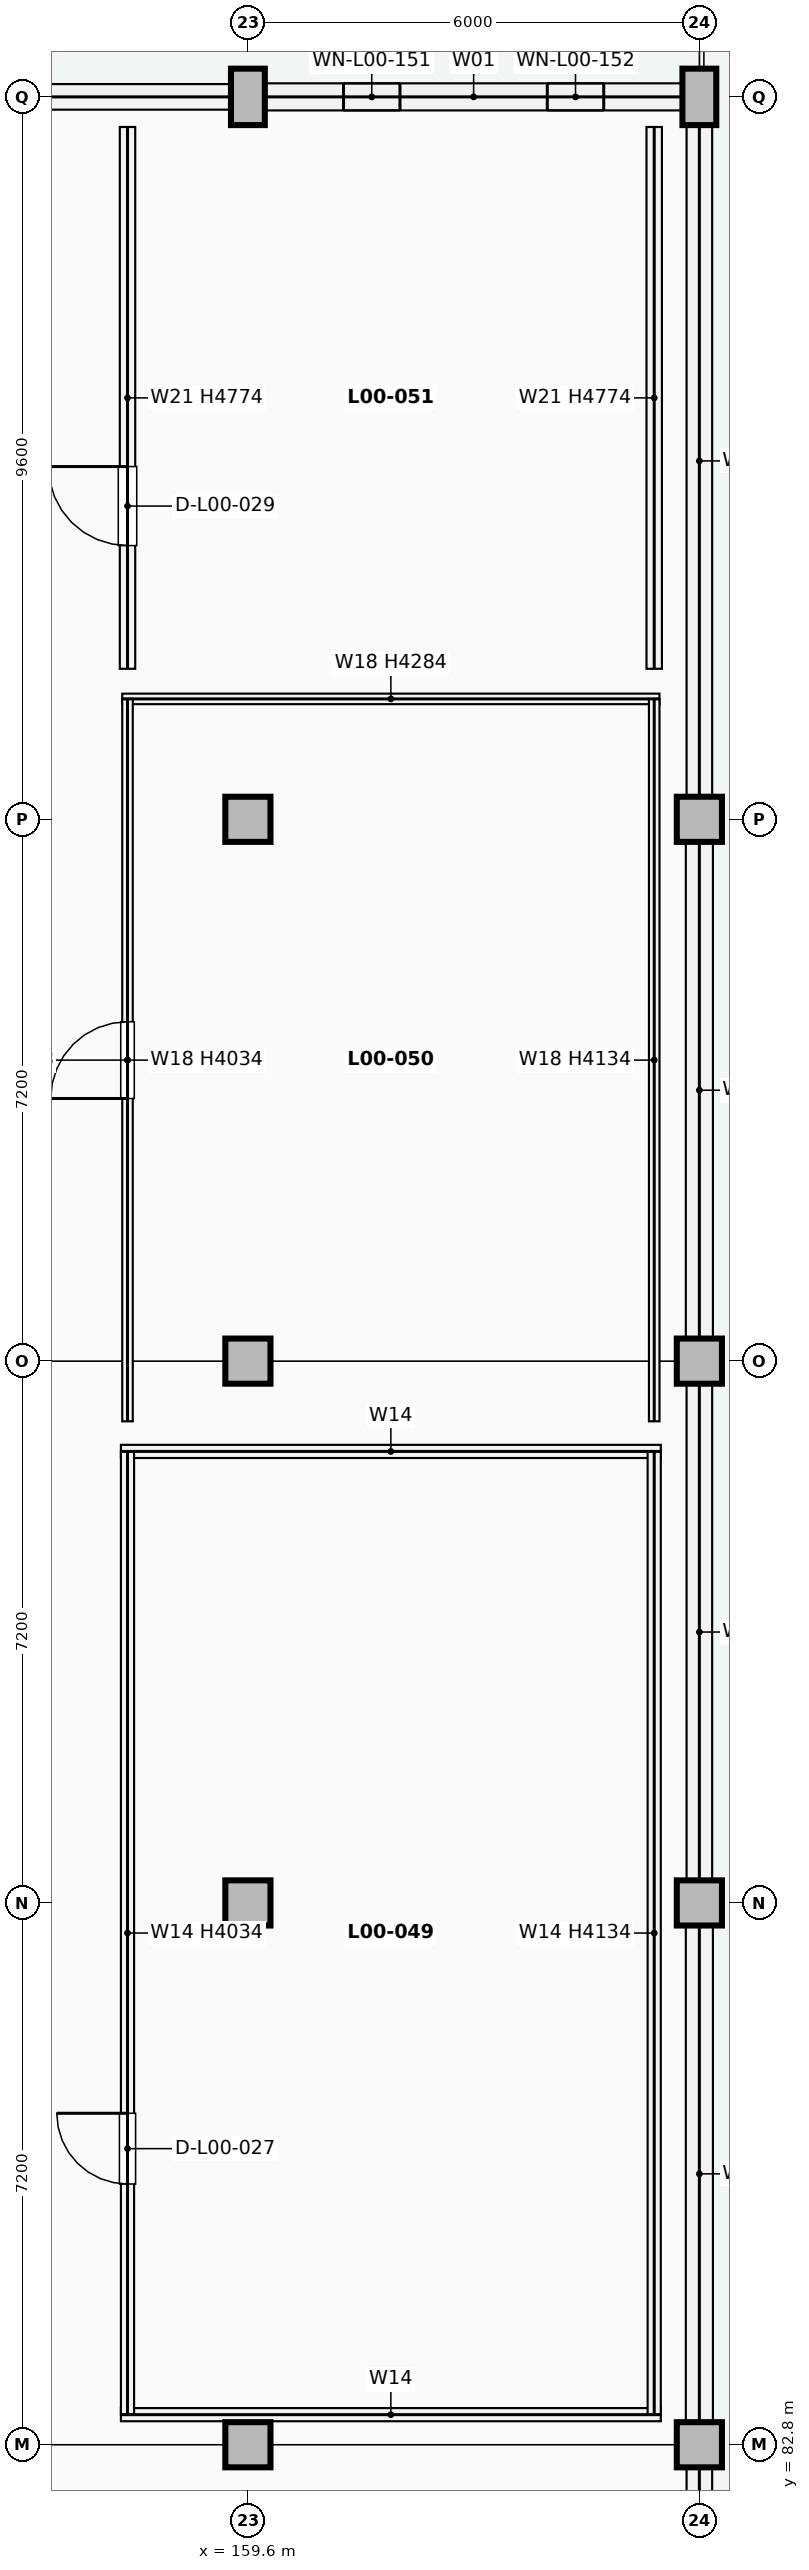
"""IFC4 building model, lengths in metres.
Left out: names, types, materials, properties, quantities, classifications, styles, units other than length and angle.
Written with IfcOpenShell. Run it as: python <this file> out.ifc"""

import sys

from ifc_helpers import new_model, si_unit, direction, frame, frame_2d, origin, origin_2d, place, context, subcontext, project, spatial, rectangle, extrude, element, fill, save


model = new_model("IFC4")
c1 = context("Model", 3, precision=1e-05, world=origin(), true_north=direction((0.0, 1.0)))
c2 = subcontext(c1, "Body", "Model", "MODEL_VIEW")
j1 = project(units=[si_unit("LENGTHUNIT", "METRE"), si_unit("PLANEANGLEUNIT", "RADIAN")], contexts=[c1])
p1 = place(None, origin())
s1 = spatial("IfcSite", under=j1, at=p1, CompositionType="ELEMENT")
p2 = place(p1, origin())
s2 = spatial("IfcBuilding", under=s1, at=p2, CompositionType="ELEMENT")
p3 = place(p2, origin())
s3 = spatial("IfcBuildingStorey", under=s2, at=p3, CompositionType="ELEMENT", Elevation=0.0)
for number, where, z_axis, x_axis in (
    (1, (159.6, 82.8, 0.0), (0.0, 0.0, 1.0), (1.0, 0.0, 0.0)),
    (2, (159.6, 90.0, 0.0), (0.0, 0.0, 1.0), (1.0, 0.0, 0.0)),
    (3, (159.6, 97.2, 0.0), (0.0, 0.0, 1.0), (1.0, 0.0, 0.0)),
    (4, (159.6, 104.4, 0.0), (0.0, 0.0, 1.0), (1.0, 0.0, 0.0)),
):
    element("IfcColumn", number, at=place(p3, frame(where, z_axis=z_axis, x_axis=x_axis)), inside=s3, PredefinedType="COLUMN", context=c2, shape_type="SweptSolid", body=[
        extrude(rectangle(XDim=0.6, YDim=0.6, at=origin_2d()), origin(), (0.0, 0.0, 1.0), 5.1),
    ])
p4 = place(p3, frame((159.6, 114.0, 0.0), z_axis=(0.0, 0.0, 1.0), x_axis=(1.0, 0.0, 0.0)))
e5 = element("IfcColumn", 5, at=p4, inside=s3, PredefinedType="PILASTER", context=c2, shape_type="SweptSolid", body=[
    extrude(rectangle(XDim=0.45, YDim=0.75, at=origin_2d()), origin(), (0.0, 0.0, 1.0), 5.1),
])
for number, where, z_axis, x_axis in (
    (6, (165.6, 82.8, 0.0), (0.0, 0.0, 1.0), (1.0, 0.0, 0.0)),
    (7, (165.6, 90.0, 0.0), (0.0, 0.0, 1.0), (1.0, 0.0, 0.0)),
    (8, (165.6, 97.2, 0.0), (0.0, 0.0, 1.0), (1.0, 0.0, 0.0)),
    (9, (165.6, 104.4, 0.0), (0.0, 0.0, 1.0), (1.0, 0.0, 0.0)),
):
    element("IfcColumn", number, at=place(p3, frame(where, z_axis=z_axis, x_axis=x_axis)), inside=s3, PredefinedType="COLUMN", context=c2, shape_type="SweptSolid", body=[
        extrude(rectangle(XDim=0.6, YDim=0.6, at=origin_2d()), origin(), (0.0, 0.0, 1.0), 5.1),
    ])
p5 = place(p3, frame((165.6, 114.0, 0.0), z_axis=(0.0, 0.0, 1.0), x_axis=(1.0, 0.0, 0.0)))
e10 = element("IfcColumn", 10, at=p5, inside=s3, PredefinedType="PILASTER", context=c2, shape_type="SweptSolid", body=[
    extrude(rectangle(XDim=0.45, YDim=0.75, at=origin_2d()), origin(), (0.0, 0.0, 1.0), 5.1),
])
p6 = place(p3, frame((150.227, 114.0, 0.0), z_axis=(0.0, 0.0, 1.0), x_axis=(1.0, 0.0, 0.0)))
e11 = element("IfcWall", 11, at=p6, inside=s3, PredefinedType="SOLIDWALL", context=c2, shape_type="SweptSolid", body=[
    extrude(rectangle(XDim=9.146, YDim=0.34, at=frame_2d((4.573, 0.0))), origin(), (0.0, 0.0, 1.0), 4.284),
])
p7 = place(p6, frame((3.673, 0.0, 0.0)))
e12 = element("IfcOpeningElement", 12, at=p7, cuts=e11, PredefinedType="OPENING", context=c2, shape_type="SweptSolid", body=[
    extrude(rectangle(XDim=1.8, YDim=2.3, at=frame_2d((0.9, 1.15))), frame((0.0, 0.18, 0.0), z_axis=(0.0, -1.0, 0.0), x_axis=(1.0, 0.0, 0.0)), (0.0, 0.0, 1.0), 0.36),
])
p8 = place(p3, frame((159.827, 114.0, 0.0), z_axis=(0.0, 0.0, 1.0), x_axis=(1.0, 0.0, 0.0)))
e13 = element("IfcWall", 13, at=p8, inside=s3, PredefinedType="SOLIDWALL", context=c2, shape_type="SweptSolid", body=[
    extrude(rectangle(XDim=5.546, YDim=0.36, at=frame_2d((2.773, 0.0))), origin(), (0.0, 0.0, 1.0), 4.284),
])
p9 = place(p8, frame((1.044, 0.0, 0.75)))
e14 = element("IfcOpeningElement", 14, at=p9, cuts=e13, PredefinedType="OPENING", context=c2, shape_type="SweptSolid", body=[
    extrude(rectangle(XDim=0.75, YDim=1.7, at=frame_2d((0.375, 0.85))), frame((0.0, 0.19, 0.0), z_axis=(0.0, -1.0, 0.0), x_axis=(1.0, 0.0, 0.0)), (0.0, 0.0, 1.0), 0.38),
])
p10 = place(p8, frame((3.752, 0.0, 0.75)))
e15 = element("IfcOpeningElement", 15, at=p10, cuts=e13, PredefinedType="OPENING", context=c2, shape_type="SweptSolid", body=[
    extrude(rectangle(XDim=0.75, YDim=1.7, at=frame_2d((0.375, 0.85))), frame((0.0, 0.19, 0.0), z_axis=(0.0, -1.0, 0.0), x_axis=(1.0, 0.0, 0.0)), (0.0, 0.0, 1.0), 0.38),
])
p11 = place(p3, frame((165.6, 79.502, 0.0), z_axis=(0.0, 0.0, 1.0), x_axis=(0.0, 1.0, 0.0)))
e16 = element("IfcWall", 16, at=p11, inside=s3, PredefinedType="SOLIDWALL", context=c2, shape_type="SweptSolid", body=[
    extrude(rectangle(XDim=2.996, YDim=0.34, at=frame_2d((1.498, 0.0))), origin(), (0.0, 0.0, 1.0), 4.134),
])
p12 = place(p3, frame((165.6, 83.102, 0.0), z_axis=(0.0, 0.0, 1.0), x_axis=(0.0, 1.0, 0.0)))
e17 = element("IfcWall", 17, at=p12, inside=s3, PredefinedType="SOLIDWALL", context=c2, shape_type="SweptSolid", body=[
    extrude(rectangle(XDim=6.596, YDim=0.36, at=frame_2d((3.298, 0.0))), origin(), (0.0, 0.0, 1.0), 4.134),
])
p13 = place(p3, frame((165.6, 90.302, 0.0), z_axis=(0.0, 0.0, 1.0), x_axis=(0.0, 1.0, 0.0)))
e18 = element("IfcWall", 18, at=p13, inside=s3, PredefinedType="SOLIDWALL", context=c2, shape_type="SweptSolid", body=[
    extrude(rectangle(XDim=6.596, YDim=0.34, at=frame_2d((3.298, 0.0))), origin(), (0.0, 0.0, 1.0), 4.134),
])
p14 = place(p3, frame((165.6, 97.502, 0.0), z_axis=(0.0, 0.0, 1.0), x_axis=(0.0, 1.0, 0.0)))
e19 = element("IfcWall", 19, at=p14, inside=s3, PredefinedType="SOLIDWALL", context=c2, shape_type="SweptSolid", body=[
    extrude(rectangle(XDim=6.596, YDim=0.36, at=frame_2d((3.298, 0.0))), origin(), (0.0, 0.0, 1.0), 4.134),
])
p15 = place(p3, frame((165.6, 104.702, 0.0), z_axis=(0.0, 0.0, 1.0), x_axis=(0.0, 1.0, 0.0)))
e20 = element("IfcWall", 20, at=p15, inside=s3, PredefinedType="SOLIDWALL", context=c2, shape_type="SweptSolid", body=[
    extrude(rectangle(XDim=8.921, YDim=0.34, at=frame_2d((4.46, 0.0))), origin(), (0.0, 0.0, 1.0), 4.134),
])
for number, where, z_axis, x_axis in (
    (21, (157.913, 83.2, 0.0), (0.0, 0.0, 1.0), (1.0, 0.0, 0.0)),
    (22, (157.913, 96.0, 0.0), (0.0, 0.0, 1.0), (1.0, 0.0, 0.0)),
):
    element("IfcWall", number, at=place(p3, frame(where, z_axis=z_axis, x_axis=x_axis)), inside=s3, PredefinedType="PARTITIONING", context=c2, shape_type="SweptSolid", body=[
        extrude(rectangle(XDim=7.175, YDim=0.175, at=frame_2d((3.587, 0.0))), origin(), (0.0, 0.0, 1.0), 4.284),
    ])
p16 = place(p3, frame((158.0, 83.2, 0.0), z_axis=(0.0, 0.0, 1.0), x_axis=(0.0, 1.0, 0.0)))
e23 = element("IfcWall", 23, at=p16, inside=s3, PredefinedType="PARTITIONING", context=c2, shape_type="SweptSolid", body=[
    extrude(rectangle(XDim=12.8, YDim=0.175, at=frame_2d((6.4, 0.0))), origin(), (0.0, 0.0, 1.0), 4.034),
])
p17 = place(p16, frame((3.065, 0.0, 0.0)))
e24 = element("IfcOpeningElement", 24, at=p17, cuts=e23, PredefinedType="OPENING", context=c2, shape_type="SweptSolid", body=[
    extrude(rectangle(XDim=0.94, YDim=2.1, at=frame_2d((0.47, 1.05))), frame((0.0, 0.098, 0.0), z_axis=(0.0, -1.0, 0.0), x_axis=(1.0, 0.0, 0.0)), (0.0, 0.0, 1.0), 0.195),
])
p18 = place(p3, frame((165.0, 83.2, 0.0), z_axis=(0.0, 0.0, 1.0), x_axis=(0.0, 1.0, 0.0)))
e25 = element("IfcWall", 25, at=p18, inside=s3, PredefinedType="PARTITIONING", context=c2, shape_type="SweptSolid", body=[
    extrude(rectangle(XDim=12.8, YDim=0.175, at=frame_2d((6.4, 0.0))), origin(), (0.0, 0.0, 1.0), 4.134),
])
p19 = place(p3, frame((157.93, 106.0, 0.0), z_axis=(0.0, 0.0, 1.0), x_axis=(1.0, 0.0, 0.0)))
e26 = element("IfcWall", 26, at=p19, inside=s3, PredefinedType="PARTITIONING", context=c2, shape_type="SweptSolid", body=[
    extrude(rectangle(XDim=7.14, YDim=0.14, at=frame_2d((3.57, 0.0))), origin(), (0.0, 0.0, 1.0), 4.284),
])
p20 = place(p3, frame((158.0, 96.4, 0.0), z_axis=(0.0, 0.0, 1.0), x_axis=(0.0, 1.0, 0.0)))
e27 = element("IfcWall", 27, at=p20, inside=s3, PredefinedType="PARTITIONING", context=c2, shape_type="SweptSolid", body=[
    extrude(rectangle(XDim=9.6, YDim=0.14, at=frame_2d((4.8, 0.0))), origin(), (0.0, 0.0, 1.0), 4.034),
])
p21 = place(p20, frame((4.29, 0.0, 0.0)))
e28 = element("IfcOpeningElement", 28, at=p21, cuts=e27, PredefinedType="OPENING", context=c2, shape_type="SweptSolid", body=[
    extrude(rectangle(XDim=1.02, YDim=2.18, at=frame_2d((0.51, 1.09))), frame((0.0, 0.08, 0.0), z_axis=(0.0, -1.0, 0.0), x_axis=(1.0, 0.0, 0.0)), (0.0, 0.0, 1.0), 0.16),
])
p22 = place(p3, frame((165.0, 96.4, 0.0), z_axis=(0.0, 0.0, 1.0), x_axis=(0.0, 1.0, 0.0)))
e29 = element("IfcWall", 29, at=p22, inside=s3, PredefinedType="PARTITIONING", context=c2, shape_type="SweptSolid", body=[
    extrude(rectangle(XDim=9.6, YDim=0.14, at=frame_2d((4.8, 0.0))), origin(), (0.0, 0.0, 1.0), 4.134),
])
p23 = place(p3, frame((158.0, 106.4, 0.0), z_axis=(0.0, 0.0, 1.0), x_axis=(0.0, 1.0, 0.0)))
e30 = element("IfcWall", 30, at=p23, inside=s3, PredefinedType="PARTITIONING", context=c2, shape_type="SweptSolid", body=[
    extrude(rectangle(XDim=7.2, YDim=0.205, at=frame_2d((3.6, 0.0))), origin(), (0.0, 0.0, 1.0), 4.774),
])
p24 = place(p23, frame((1.637, 0.0, 0.0)))
e31 = element("IfcOpeningElement", 31, at=p24, cuts=e30, PredefinedType="OPENING", context=c2, shape_type="SweptSolid", body=[
    extrude(rectangle(XDim=1.05, YDim=2.15, at=frame_2d((0.525, 1.075))), frame((0.0, 0.113, 0.0), z_axis=(0.0, -1.0, 0.0), x_axis=(1.0, 0.0, 0.0)), (0.0, 0.0, 1.0), 0.225),
])
p25 = place(p3, frame((165.0, 106.4, 0.0), z_axis=(0.0, 0.0, 1.0), x_axis=(0.0, 1.0, 0.0)))
e32 = element("IfcWall", 32, at=p25, inside=s3, PredefinedType="PARTITIONING", context=c2, shape_type="SweptSolid", body=[
    extrude(rectangle(XDim=7.2, YDim=0.205, at=frame_2d((3.6, 0.0))), origin(), (0.0, 0.0, 1.0), 4.774),
])
p26 = place(p9, origin())
e33 = element("IfcWindow", 33, at=p26, inside=s3, PartitioningType="SINGLE_PANEL", PredefinedType="WINDOW", context=c2, shape_type="SweptSolid", body=[
    extrude(rectangle(XDim=0.75, YDim=1.7, at=frame_2d((0.375, 0.85))), frame((0.0, 0.03, 0.0), z_axis=(0.0, -1.0, 0.0), x_axis=(1.0, 0.0, 0.0)), (0.0, 0.0, 1.0), 0.06),
])
fill(e14, e33)
p27 = place(p10, origin())
e34 = element("IfcWindow", 34, at=p27, inside=s3, PartitioningType="SINGLE_PANEL", PredefinedType="WINDOW", context=c2, shape_type="SweptSolid", body=[
    extrude(rectangle(XDim=0.75, YDim=1.7, at=frame_2d((0.375, 0.85))), frame((0.0, 0.03, 0.0), z_axis=(0.0, -1.0, 0.0), x_axis=(1.0, 0.0, 0.0)), (0.0, 0.0, 1.0), 0.06),
])
fill(e15, e34)
p28 = place(p17, origin())
e35 = element("IfcDoor", 35, at=p28, inside=s3, OperationType="SINGLE_SWING_RIGHT", PredefinedType="DOOR", context=c2, shape_type="SweptSolid", body=[
    extrude(rectangle(XDim=0.94, YDim=2.1, at=frame_2d((0.47, 1.05))), frame((0.0, 0.025, 0.0), z_axis=(0.0, -1.0, 0.0), x_axis=(1.0, 0.0, 0.0)), (0.0, 0.0, 1.0), 0.05),
])
fill(e24, e35)
p29 = place(p21, origin())
e36 = element("IfcDoor", 36, at=p29, inside=s3, OperationType="SINGLE_SWING_LEFT", PredefinedType="DOOR", context=c2, shape_type="SweptSolid", body=[
    extrude(rectangle(XDim=1.02, YDim=2.18, at=frame_2d((0.51, 1.09))), frame((0.0, 0.025, 0.0), z_axis=(0.0, -1.0, 0.0), x_axis=(1.0, 0.0, 0.0)), (0.0, 0.0, 1.0), 0.05),
])
fill(e28, e36)
p30 = place(p24, origin())
e37 = element("IfcDoor", 37, at=p30, inside=s3, OperationType="SINGLE_SWING_RIGHT", PredefinedType="DOOR", context=c2, shape_type="SweptSolid", body=[
    extrude(rectangle(XDim=1.05, YDim=2.15, at=frame_2d((0.525, 1.075))), frame((0.0, 0.025, 0.0), z_axis=(0.0, -1.0, 0.0), x_axis=(1.0, 0.0, 0.0)), (0.0, 0.0, 1.0), 0.05),
])
fill(e31, e37)
save(model, sys.argv[1])
